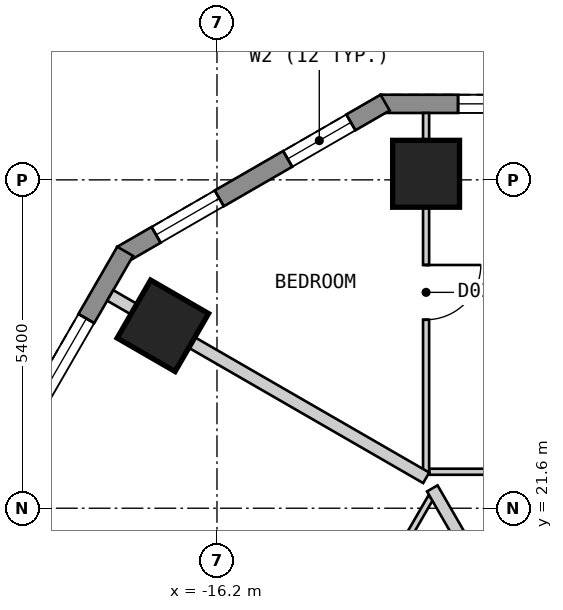
"""IFC4 building model, lengths in metres.
Left out: names, types, materials, properties, quantities, classifications, styles, units other than length and angle.
Written with IfcOpenShell. Run it as: python <this file> out.ifc"""

import sys

from ifc_helpers import new_model, si_unit, direction, frame, frame_2d, origin, origin_2d, place, context, subcontext, project, spatial, polyline, rectangle, outline, extrude, element, fill, save


model = new_model("IFC4")
c1 = context("Model", 3, precision=1e-05, world=origin(), true_north=direction((0.0, 1.0)))
c2 = subcontext(c1, "Body", "Model", "MODEL_VIEW")
j1 = project(units=[si_unit("LENGTHUNIT", "METRE"), si_unit("PLANEANGLEUNIT", "RADIAN")], contexts=[c1])
p1 = place(None, origin())
s1 = spatial("IfcSite", under=j1, at=p1, CompositionType="ELEMENT")
p2 = place(p1, origin())
s2 = spatial("IfcBuilding", under=s1, at=p2, CompositionType="ELEMENT")
p3 = place(p2, frame((0.0, 0.0, 41.4)))
s3 = spatial("IfcBuildingStorey", under=s2, at=p3, CompositionType="ELEMENT", Elevation=41.4)
for number, where, z_axis, x_axis in (
    (1, (-12.761, 27.1, 0.0), (0.0, 0.0, 1.0), (-1.0, 0.0, 0.0)),
    (2, (-17.09, 24.6, 0.0), (0.0, 0.0, 1.0), (-0.5, -0.866, 0.0)),
):
    element("IfcColumn", number, at=place(p3, frame(where, z_axis=z_axis, x_axis=x_axis)), inside=s3, PredefinedType="COLUMN", context=c2, shape_type="SweptSolid", body=[
        extrude(rectangle(XDim=1.1, YDim=1.1, at=origin_2d()), origin(), (0.0, 0.0, 1.0), 3.0),
    ])
p4 = place(p3, frame((13.51, 28.25, 0.0), z_axis=(0.0, 0.0, 1.0), x_axis=(-1.0, 0.0, 0.0)))
e3 = element("IfcWall", 3, at=p4, inside=s3, PredefinedType="SOLIDWALL", context=c2, shape_type="SweptSolid", body=[
    extrude(outline(polyline([(0.0, -0.15), (27.02, -0.15), (26.94, 0.15), (0.08, 0.15), (0.0, -0.15)])), origin(), (0.0, 0.0, 1.0), 2.7),
])
p5 = place(p4, frame((1.277, 0.0, 0.15)))
e4 = element("IfcOpeningElement", 4, at=p5, cuts=e3, PredefinedType="OPENING", context=c2, shape_type="SweptSolid", body=[
    extrude(rectangle(XDim=1.5, YDim=2.1, at=frame_2d((0.75, 1.05))), frame((0.0, 0.16, 0.0), z_axis=(0.0, -1.0, 0.0), x_axis=(1.0, 0.0, 0.0)), (0.0, 0.0, 1.0), 0.32),
])
p6 = place(p4, frame((3.829, 0.0, 0.15)))
e5 = element("IfcOpeningElement", 5, at=p6, cuts=e3, PredefinedType="OPENING", context=c2, shape_type="SweptSolid", body=[
    extrude(rectangle(XDim=1.5, YDim=2.1, at=frame_2d((0.75, 1.05))), frame((0.0, 0.16, 0.0), z_axis=(0.0, -1.0, 0.0), x_axis=(1.0, 0.0, 0.0)), (0.0, 0.0, 1.0), 0.32),
])
p7 = place(p4, frame((6.381, 0.0, 0.15)))
e6 = element("IfcOpeningElement", 6, at=p7, cuts=e3, PredefinedType="OPENING", context=c2, shape_type="SweptSolid", body=[
    extrude(rectangle(XDim=1.5, YDim=2.1, at=frame_2d((0.75, 1.05))), frame((0.0, 0.16, 0.0), z_axis=(0.0, -1.0, 0.0), x_axis=(1.0, 0.0, 0.0)), (0.0, 0.0, 1.0), 0.32),
])
p8 = place(p4, frame((8.933, 0.0, 0.15)))
e7 = element("IfcOpeningElement", 7, at=p8, cuts=e3, PredefinedType="OPENING", context=c2, shape_type="SweptSolid", body=[
    extrude(rectangle(XDim=1.5, YDim=2.1, at=frame_2d((0.75, 1.05))), frame((0.0, 0.16, 0.0), z_axis=(0.0, -1.0, 0.0), x_axis=(1.0, 0.0, 0.0)), (0.0, 0.0, 1.0), 0.32),
])
p9 = place(p4, frame((11.485, 0.0, 0.15)))
e8 = element("IfcOpeningElement", 8, at=p9, cuts=e3, PredefinedType="OPENING", context=c2, shape_type="SweptSolid", body=[
    extrude(rectangle(XDim=1.5, YDim=2.1, at=frame_2d((0.75, 1.05))), frame((0.0, 0.16, 0.0), z_axis=(0.0, -1.0, 0.0), x_axis=(1.0, 0.0, 0.0)), (0.0, 0.0, 1.0), 0.32),
])
p10 = place(p4, frame((14.037, 0.0, 0.15)))
e9 = element("IfcOpeningElement", 9, at=p10, cuts=e3, PredefinedType="OPENING", context=c2, shape_type="SweptSolid", body=[
    extrude(rectangle(XDim=1.5, YDim=2.1, at=frame_2d((0.75, 1.05))), frame((0.0, 0.16, 0.0), z_axis=(0.0, -1.0, 0.0), x_axis=(1.0, 0.0, 0.0)), (0.0, 0.0, 1.0), 0.32),
])
p11 = place(p4, frame((16.589, 0.0, 0.15)))
e10 = element("IfcOpeningElement", 10, at=p11, cuts=e3, PredefinedType="OPENING", context=c2, shape_type="SweptSolid", body=[
    extrude(rectangle(XDim=1.5, YDim=2.1, at=frame_2d((0.75, 1.05))), frame((0.0, 0.16, 0.0), z_axis=(0.0, -1.0, 0.0), x_axis=(1.0, 0.0, 0.0)), (0.0, 0.0, 1.0), 0.32),
])
p12 = place(p4, frame((19.141, 0.0, 0.15)))
e11 = element("IfcOpeningElement", 11, at=p12, cuts=e3, PredefinedType="OPENING", context=c2, shape_type="SweptSolid", body=[
    extrude(rectangle(XDim=1.5, YDim=2.1, at=frame_2d((0.75, 1.05))), frame((0.0, 0.16, 0.0), z_axis=(0.0, -1.0, 0.0), x_axis=(1.0, 0.0, 0.0)), (0.0, 0.0, 1.0), 0.32),
])
p13 = place(p4, frame((21.693, 0.0, 0.15)))
e12 = element("IfcOpeningElement", 12, at=p13, cuts=e3, PredefinedType="OPENING", context=c2, shape_type="SweptSolid", body=[
    extrude(rectangle(XDim=1.5, YDim=2.1, at=frame_2d((0.75, 1.05))), frame((0.0, 0.16, 0.0), z_axis=(0.0, -1.0, 0.0), x_axis=(1.0, 0.0, 0.0)), (0.0, 0.0, 1.0), 0.32),
])
p14 = place(p4, frame((24.245, 0.0, 0.15)))
e13 = element("IfcOpeningElement", 13, at=p14, cuts=e3, PredefinedType="OPENING", context=c2, shape_type="SweptSolid", body=[
    extrude(rectangle(XDim=1.5, YDim=2.1, at=frame_2d((0.75, 1.05))), frame((0.0, 0.16, 0.0), z_axis=(0.0, -1.0, 0.0), x_axis=(1.0, 0.0, 0.0)), (0.0, 0.0, 1.0), 0.32),
])
p15 = place(p3, frame((-13.435, 28.27, 0.0), z_axis=(0.0, 0.0, 1.0), x_axis=(-0.866010750942, -0.50002537861, 0.0)))
e14 = element("IfcWall", 14, at=p15, inside=s3, PredefinedType="SOLIDWALL", context=c2, shape_type="SweptSolid", body=[
    extrude(outline(polyline([(0.0, -0.15), (5.0, -0.15), (4.919, 0.15), (0.08, 0.15), (0.0, -0.15)])), origin(), (0.0, 0.0, 1.0), 2.7),
])
p16 = place(p15, frame((0.65, 0.0, 0.15)))
e15 = element("IfcOpeningElement", 15, at=p16, cuts=e14, PredefinedType="OPENING", context=c2, shape_type="SweptSolid", body=[
    extrude(rectangle(XDim=1.2, YDim=2.1, at=frame_2d((0.6, 1.05))), frame((0.0, 0.16, 0.0), z_axis=(0.0, -1.0, 0.0), x_axis=(1.0, 0.0, 0.0)), (0.0, 0.0, 1.0), 0.32),
])
p17 = place(p15, frame((3.149, 0.0, 0.15)))
e16 = element("IfcOpeningElement", 16, at=p17, cuts=e14, PredefinedType="OPENING", context=c2, shape_type="SweptSolid", body=[
    extrude(rectangle(XDim=1.2, YDim=2.1, at=frame_2d((0.6, 1.05))), frame((0.0, 0.16, 0.0), z_axis=(0.0, -1.0, 0.0), x_axis=(1.0, 0.0, 0.0)), (0.0, 0.0, 1.0), 0.32),
])
p18 = place(p3, frame((-17.71, 25.825, 0.0), z_axis=(0.0, 0.0, 1.0), x_axis=(-0.500001938803, -0.866024284413, 0.0)))
e17 = element("IfcWall", 17, at=p18, inside=s3, PredefinedType="SOLIDWALL", context=c2, shape_type="SweptSolid", body=[
    extrude(outline(polyline([(0.0, -0.15), (27.02, -0.15), (26.94, 0.15), (0.08, 0.15), (0.0, -0.15)])), origin(), (0.0, 0.0, 1.0), 2.7),
])
p19 = place(p18, frame((1.277, 0.0, 0.15)))
e18 = element("IfcOpeningElement", 18, at=p19, cuts=e17, PredefinedType="OPENING", context=c2, shape_type="SweptSolid", body=[
    extrude(rectangle(XDim=1.5, YDim=2.1, at=frame_2d((0.75, 1.05))), frame((0.0, 0.16, 0.0), z_axis=(0.0, -1.0, 0.0), x_axis=(1.0, 0.0, 0.0)), (0.0, 0.0, 1.0), 0.32),
])
p20 = place(p18, frame((3.829, 0.0, 0.15)))
e19 = element("IfcOpeningElement", 19, at=p20, cuts=e17, PredefinedType="OPENING", context=c2, shape_type="SweptSolid", body=[
    extrude(rectangle(XDim=1.5, YDim=2.1, at=frame_2d((0.75, 1.05))), frame((0.0, 0.16, 0.0), z_axis=(0.0, -1.0, 0.0), x_axis=(1.0, 0.0, 0.0)), (0.0, 0.0, 1.0), 0.32),
])
p21 = place(p18, frame((6.382, 0.0, 0.15)))
e20 = element("IfcOpeningElement", 20, at=p21, cuts=e17, PredefinedType="OPENING", context=c2, shape_type="SweptSolid", body=[
    extrude(rectangle(XDim=1.5, YDim=2.1, at=frame_2d((0.75, 1.05))), frame((0.0, 0.16, 0.0), z_axis=(0.0, -1.0, 0.0), x_axis=(1.0, 0.0, 0.0)), (0.0, 0.0, 1.0), 0.32),
])
p22 = place(p18, frame((8.933, 0.0, 0.15)))
e21 = element("IfcOpeningElement", 21, at=p22, cuts=e17, PredefinedType="OPENING", context=c2, shape_type="SweptSolid", body=[
    extrude(rectangle(XDim=1.5, YDim=2.1, at=frame_2d((0.75, 1.05))), frame((0.0, 0.16, 0.0), z_axis=(0.0, -1.0, 0.0), x_axis=(1.0, 0.0, 0.0)), (0.0, 0.0, 1.0), 0.32),
])
p23 = place(p18, frame((11.485, 0.0, 0.15)))
e22 = element("IfcOpeningElement", 22, at=p23, cuts=e17, PredefinedType="OPENING", context=c2, shape_type="SweptSolid", body=[
    extrude(rectangle(XDim=1.5, YDim=2.1, at=frame_2d((0.75, 1.05))), frame((0.0, 0.16, 0.0), z_axis=(0.0, -1.0, 0.0), x_axis=(1.0, 0.0, 0.0)), (0.0, 0.0, 1.0), 0.32),
])
p24 = place(p18, frame((14.037, 0.0, 0.15)))
e23 = element("IfcOpeningElement", 23, at=p24, cuts=e17, PredefinedType="OPENING", context=c2, shape_type="SweptSolid", body=[
    extrude(rectangle(XDim=1.5, YDim=2.1, at=frame_2d((0.75, 1.05))), frame((0.0, 0.16, 0.0), z_axis=(0.0, -1.0, 0.0), x_axis=(1.0, 0.0, 0.0)), (0.0, 0.0, 1.0), 0.32),
])
p25 = place(p18, frame((16.589, 0.0, 0.15)))
e24 = element("IfcOpeningElement", 24, at=p25, cuts=e17, PredefinedType="OPENING", context=c2, shape_type="SweptSolid", body=[
    extrude(rectangle(XDim=1.5, YDim=2.1, at=frame_2d((0.75, 1.05))), frame((0.0, 0.16, 0.0), z_axis=(0.0, -1.0, 0.0), x_axis=(1.0, 0.0, 0.0)), (0.0, 0.0, 1.0), 0.32),
])
p26 = place(p18, frame((19.141, 0.0, 0.15)))
e25 = element("IfcOpeningElement", 25, at=p26, cuts=e17, PredefinedType="OPENING", context=c2, shape_type="SweptSolid", body=[
    extrude(rectangle(XDim=1.5, YDim=2.1, at=frame_2d((0.75, 1.05))), frame((0.0, 0.16, 0.0), z_axis=(0.0, -1.0, 0.0), x_axis=(1.0, 0.0, 0.0)), (0.0, 0.0, 1.0), 0.32),
])
p27 = place(p18, frame((21.693, 0.0, 0.15)))
e26 = element("IfcOpeningElement", 26, at=p27, cuts=e17, PredefinedType="OPENING", context=c2, shape_type="SweptSolid", body=[
    extrude(rectangle(XDim=1.5, YDim=2.1, at=frame_2d((0.75, 1.05))), frame((0.0, 0.16, 0.0), z_axis=(0.0, -1.0, 0.0), x_axis=(1.0, 0.0, 0.0)), (0.0, 0.0, 1.0), 0.32),
])
p28 = place(p18, frame((24.244, 0.0, 0.15)))
e27 = element("IfcOpeningElement", 27, at=p28, cuts=e17, PredefinedType="OPENING", context=c2, shape_type="SweptSolid", body=[
    extrude(rectangle(XDim=1.5, YDim=2.1, at=frame_2d((0.75, 1.05))), frame((0.0, 0.16, 0.0), z_axis=(0.0, -1.0, 0.0), x_axis=(1.0, 0.0, 0.0)), (0.0, 0.0, 1.0), 0.32),
])
p29 = place(p3, frame((-12.711, 22.2, 0.0), z_axis=(0.0, 0.0, 1.0), x_axis=(1.0, 0.0, 0.0)))
e28 = element("IfcWall", 28, at=p29, inside=s3, PredefinedType="PARTITIONING", context=c2, shape_type="SweptSolid", body=[
    extrude(rectangle(XDim=10.058, YDim=0.1, at=frame_2d((5.029, 0.0))), origin(), (0.0, 0.0, 1.0), 2.7),
])
p30 = place(p29, frame((7.156, 0.0, 0.0)))
e29 = element("IfcOpeningElement", 29, at=p30, cuts=e28, PredefinedType="OPENING", context=c2, shape_type="SweptSolid", body=[
    extrude(rectangle(XDim=0.9, YDim=2.1, at=frame_2d((0.45, 1.05))), frame((0.0, 0.06, 0.0), z_axis=(0.0, -1.0, 0.0), x_axis=(1.0, 0.0, 0.0)), (0.0, 0.0, 1.0), 0.12),
])
p31 = place(p29, frame((2.102, 0.0, 0.0)))
e30 = element("IfcOpeningElement", 30, at=p31, cuts=e28, PredefinedType="OPENING", context=c2, shape_type="SweptSolid", body=[
    extrude(rectangle(XDim=0.8, YDim=2.1, at=frame_2d((0.4, 1.05))), frame((0.0, 0.06, 0.0), z_axis=(0.0, -1.0, 0.0), x_axis=(1.0, 0.0, 0.0)), (0.0, 0.0, 1.0), 0.12),
])
p32 = place(p3, frame((-20.169, 8.812, 0.0), z_axis=(0.0, 0.0, 1.0), x_axis=(0.499995459772, 0.86602802507, 0.0)))
e31 = element("IfcWall", 31, at=p32, inside=s3, PredefinedType="PARTITIONING", context=c2, shape_type="SweptSolid", body=[
    extrude(rectangle(XDim=14.966, YDim=0.1, at=frame_2d((7.483, 0.0))), origin(), (0.0, 0.0, 1.0), 2.7),
])
p33 = place(p32, frame((7.105, 0.0, 0.0)))
e32 = element("IfcOpeningElement", 32, at=p33, cuts=e31, PredefinedType="OPENING", context=c2, shape_type="SweptSolid", body=[
    extrude(rectangle(XDim=0.9, YDim=2.1, at=frame_2d((0.45, 1.05))), frame((0.0, 0.06, 0.0), z_axis=(0.0, -1.0, 0.0), x_axis=(1.0, 0.0, 0.0)), (0.0, 0.0, 1.0), 0.12),
])
p34 = place(p3, frame((-12.761, 22.2, 0.0), z_axis=(0.0, 0.0, 1.0), x_axis=(0.0, 1.0, 0.0)))
e33 = element("IfcWall", 33, at=p34, inside=s3, PredefinedType="PARTITIONING", context=c2, shape_type="SweptSolid", body=[
    extrude(rectangle(XDim=5.9, YDim=0.1, at=frame_2d((2.95, 0.0))), origin(), (0.0, 0.0, 1.0), 2.7),
])
p35 = place(p34, frame((2.5, 0.0, 0.0)))
e34 = element("IfcOpeningElement", 34, at=p35, cuts=e33, PredefinedType="OPENING", context=c2, shape_type="SweptSolid", body=[
    extrude(rectangle(XDim=0.9, YDim=2.1, at=frame_2d((0.45, 1.05))), frame((0.0, 0.06, 0.0), z_axis=(0.0, -1.0, 0.0), x_axis=(1.0, 0.0, 0.0)), (0.0, 0.0, 1.0), 0.12),
])
p36 = place(p3, frame((-12.659, 21.926, 0.0), z_axis=(0.0, 0.0, 1.0), x_axis=(0.500025458316, -0.86601070492, 0.0)))
e35 = element("IfcWall", 35, at=p36, inside=s3, PredefinedType="PARTITIONING", context=c2, shape_type="SweptSolid", body=[
    extrude(rectangle(XDim=4.533, YDim=0.2, at=frame_2d((2.267, 0.0))), origin(), (0.0, 0.0, 1.0), 2.7),
])
p37 = place(p3, frame((-17.955, 25.099, 0.0), z_axis=(0.0, 0.0, 1.0), x_axis=(0.86609140076, -0.499885672459, 0.0)))
e36 = element("IfcWall", 36, at=p37, inside=s3, PredefinedType="PARTITIONING", context=c2, shape_type="SweptSolid", body=[
    extrude(rectangle(XDim=6.0, YDim=0.2, at=frame_2d((3.0, 0.0))), origin(), (0.0, 0.0, 1.0), 2.7),
])
p38 = place(p14, origin())
e37 = element("IfcWindow", 37, at=p38, inside=s3, PartitioningType="SINGLE_PANEL", PredefinedType="WINDOW", context=c2, shape_type="SweptSolid", body=[
    extrude(rectangle(XDim=1.5, YDim=2.1, at=frame_2d((0.75, 1.05))), frame((0.0, 0.03, 0.0), z_axis=(0.0, -1.0, 0.0), x_axis=(1.0, 0.0, 0.0)), (0.0, 0.0, 1.0), 0.06),
])
fill(e13, e37)
p39 = place(p16, origin())
e38 = element("IfcWindow", 38, at=p39, inside=s3, PartitioningType="SINGLE_PANEL", PredefinedType="WINDOW", context=c2, shape_type="SweptSolid", body=[
    extrude(rectangle(XDim=1.2, YDim=2.1, at=frame_2d((0.6, 1.05))), frame((0.0, 0.03, 0.0), z_axis=(0.0, -1.0, 0.0), x_axis=(1.0, 0.0, 0.0)), (0.0, 0.0, 1.0), 0.06),
])
fill(e15, e38)
p40 = place(p17, origin())
e39 = element("IfcWindow", 39, at=p40, inside=s3, PartitioningType="SINGLE_PANEL", PredefinedType="WINDOW", context=c2, shape_type="SweptSolid", body=[
    extrude(rectangle(XDim=1.2, YDim=2.1, at=frame_2d((0.6, 1.05))), frame((0.0, 0.03, 0.0), z_axis=(0.0, -1.0, 0.0), x_axis=(1.0, 0.0, 0.0)), (0.0, 0.0, 1.0), 0.06),
])
fill(e16, e39)
p41 = place(p19, origin())
e40 = element("IfcWindow", 40, at=p41, inside=s3, PartitioningType="SINGLE_PANEL", PredefinedType="WINDOW", context=c2, shape_type="SweptSolid", body=[
    extrude(rectangle(XDim=1.5, YDim=2.1, at=frame_2d((0.75, 1.05))), frame((0.0, 0.03, 0.0), z_axis=(0.0, -1.0, 0.0), x_axis=(1.0, 0.0, 0.0)), (0.0, 0.0, 1.0), 0.06),
])
fill(e18, e40)
p42 = place(p35, origin())
e41 = element("IfcDoor", 41, at=p42, inside=s3, OperationType="SINGLE_SWING_RIGHT", PredefinedType="DOOR", context=c2, shape_type="SweptSolid", body=[
    extrude(rectangle(XDim=0.9, YDim=2.1, at=frame_2d((0.45, 1.05))), frame((0.0, 0.025, 0.0), z_axis=(0.0, -1.0, 0.0), x_axis=(1.0, 0.0, 0.0)), (0.0, 0.0, 1.0), 0.05),
])
fill(e34, e41)
save(model, sys.argv[1])
